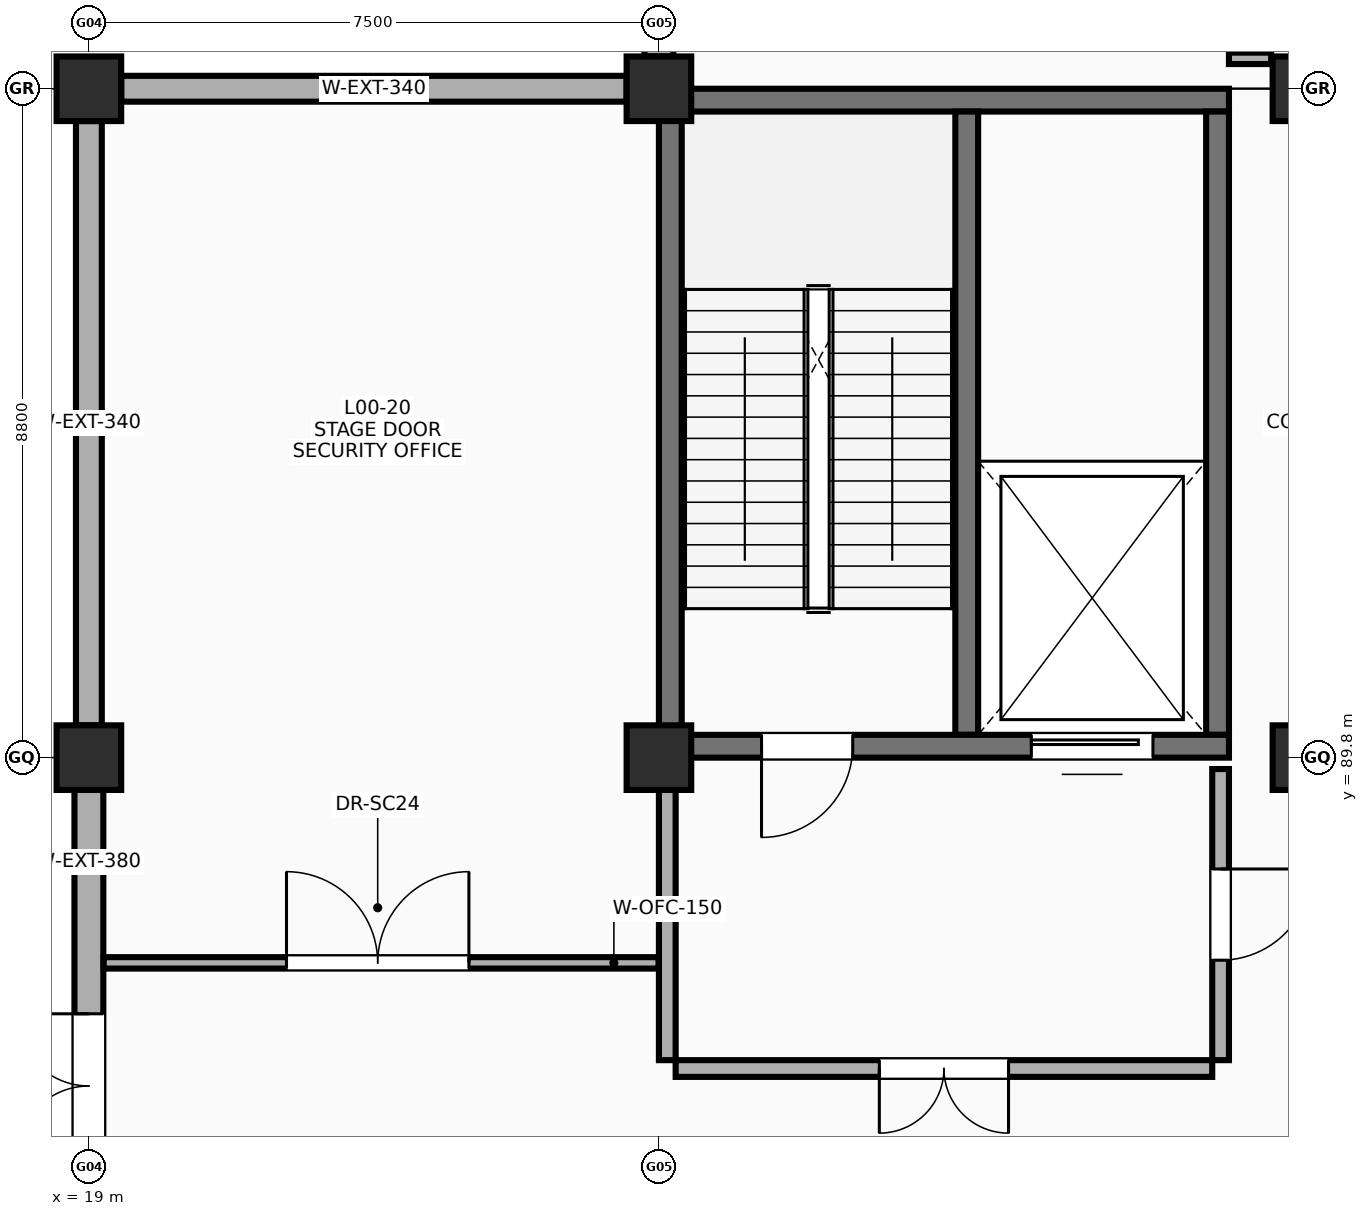
"""IFC4 building model, lengths in metres.
Left out: names, types, materials, properties, quantities, classifications, styles, units other than length and angle.
Written with IfcOpenShell. Run it as: python <this file> out.ifc"""

import sys

from ifc_helpers import new_model, si_unit, direction, frame, frame_2d, origin, origin_2d, place, context, subcontext, project, spatial, rectangle, extrude, element, fill, save


model = new_model("IFC4")
c1 = context("Model", 3, precision=1e-05, world=origin(), true_north=direction((0.0, 1.0)))
c2 = subcontext(c1, "Body", "Model", "MODEL_VIEW")
j1 = project(units=[si_unit("LENGTHUNIT", "METRE"), si_unit("PLANEANGLEUNIT", "RADIAN")], contexts=[c1])
p1 = place(None, origin())
s1 = spatial("IfcSite", under=j1, at=p1, CompositionType="ELEMENT")
p2 = place(p1, origin())
s2 = spatial("IfcBuilding", under=s1, at=p2, CompositionType="ELEMENT")
p3 = place(p2, origin())
s3 = spatial("IfcBuildingStorey", under=s2, at=p3, CompositionType="ELEMENT", Elevation=0.0)
for number, where, z_axis, x_axis in (
    (1, (19.0, 89.8, 0.0), (0.0, 0.0, 1.0), (1.0, 0.0, 0.0)),
    (2, (19.0, 98.6, 0.0), (0.0, 0.0, 1.0), (1.0, 0.0, 0.0)),
    (3, (26.5, 89.8, 0.0), (0.0, 0.0, 1.0), (1.0, 0.0, 0.0)),
    (4, (26.5, 98.6, 0.0), (0.0, 0.0, 1.0), (1.0, 0.0, 0.0)),
    (5, (35.0, 89.8, 0.0), (0.0, 0.0, 1.0), (1.0, 0.0, 0.0)),
    (6, (35.0, 98.6, 0.0), (0.0, 0.0, 1.0), (1.0, 0.0, 0.0)),
):
    element("IfcColumn", number, at=place(p3, frame(where, z_axis=z_axis, x_axis=x_axis)), inside=s3, PredefinedType="COLUMN", context=c2, shape_type="SweptSolid", body=[
        extrude(rectangle(XDim=0.85, YDim=0.85, at=origin_2d()), origin(), (0.0, 0.0, 1.0), 5.4),
    ])
p4 = place(p3, frame((26.5, 98.45, 0.0), z_axis=(0.0, 0.0, 1.0), x_axis=(1.0, 0.0, 0.0)))
e7 = element("IfcWall", 7, at=p4, inside=s3, PredefinedType="SHEAR", context=c2, shape_type="SweptSolid", body=[
    extrude(rectangle(XDim=7.5, YDim=0.3, at=frame_2d((3.75, 0.0))), origin(), (0.0, 0.0, 1.0), 5.4),
])
for number, where, z_axis, x_axis in (
    (8, (26.65, 90.1, 0.0), (0.0, 0.0, 1.0), (0.0, 1.0, 0.0)),
    (9, (33.85, 90.1, 0.0), (0.0, 0.0, 1.0), (0.0, 1.0, 0.0)),
    (10, (30.55, 90.1, 0.0), (0.0, 0.0, 1.0), (0.0, 1.0, 0.0)),
):
    element("IfcWall", number, at=place(p3, frame(where, z_axis=z_axis, x_axis=x_axis)), inside=s3, PredefinedType="SHEAR", context=c2, shape_type="SweptSolid", body=[
        extrude(rectangle(XDim=8.2, YDim=0.3, at=frame_2d((4.1, 0.0))), origin(), (0.0, 0.0, 1.0), 5.4),
    ])
p5 = place(p3, frame((26.5, 99.025, 0.0), z_axis=(0.0, 0.0, 1.0), x_axis=(0.0, 1.0, 0.0)))
e11 = element("IfcWall", 11, at=p5, inside=s3, PredefinedType="SOLIDWALL", context=c2, shape_type="SweptSolid", body=[
    extrude(rectangle(XDim=9.595, YDim=0.38, at=frame_2d((4.798, 0.0))), origin(), (0.0, 0.0, 1.0), 3.9),
])
p6 = place(p5, frame((2.755, 0.0, 0.0)))
e12 = element("IfcOpeningElement", 12, at=p6, cuts=e11, PredefinedType="OPENING", context=c2, shape_type="SweptSolid", body=[
    extrude(rectangle(XDim=4.2, YDim=3.6, at=frame_2d((2.1, 1.8))), frame((0.0, 0.2, 0.0), z_axis=(0.0, -1.0, 0.0), x_axis=(1.0, 0.0, 0.0)), (0.0, 0.0, 1.0), 0.4),
])
p7 = place(p3, frame((19.0, 81.625, 0.0), z_axis=(0.0, 0.0, 1.0), x_axis=(0.0, 1.0, 0.0)))
e13 = element("IfcWall", 13, at=p7, inside=s3, PredefinedType="SOLIDWALL", context=c2, shape_type="SweptSolid", body=[
    extrude(rectangle(XDim=7.75, YDim=0.38, at=frame_2d((3.875, 0.0))), origin(), (0.0, 0.0, 1.0), 4.15),
])
p8 = place(p7, frame((2.905, 0.0, 0.0)))
e14 = element("IfcOpeningElement", 14, at=p8, cuts=e13, PredefinedType="OPENING", context=c2, shape_type="SweptSolid", body=[
    extrude(rectangle(XDim=1.9, YDim=2.35, at=frame_2d((0.95, 1.175))), frame((0.0, 0.2, 0.0), z_axis=(0.0, -1.0, 0.0), x_axis=(1.0, 0.0, 0.0)), (0.0, 0.0, 1.0), 0.4),
])
p9 = place(p3, frame((19.0, 90.225, 0.0), z_axis=(0.0, 0.0, 1.0), x_axis=(0.0, 1.0, 0.0)))
e15 = element("IfcWall", 15, at=p9, inside=s3, PredefinedType="SOLIDWALL", context=c2, shape_type="SweptSolid", body=[
    extrude(rectangle(XDim=7.95, YDim=0.34, at=frame_2d((3.975, 0.0))), origin(), (0.0, 0.0, 1.0), 4.15),
])
p10 = place(p3, frame((19.425, 98.6, 0.0), z_axis=(0.0, 0.0, 1.0), x_axis=(1.0, 0.0, 0.0)))
e16 = element("IfcWall", 16, at=p10, inside=s3, PredefinedType="SOLIDWALL", context=c2, shape_type="SweptSolid", body=[
    extrude(rectangle(XDim=6.65, YDim=0.34, at=frame_2d((3.325, 0.0))), origin(), (0.0, 0.0, 1.0), 3.9),
])
p11 = place(p3, frame((26.5, 89.95, 0.0), z_axis=(0.0, 0.0, 1.0), x_axis=(1.0, 0.0, 0.0)))
e17 = element("IfcWall", 17, at=p11, inside=s3, PredefinedType="SHEAR", context=c2, shape_type="SweptSolid", body=[
    extrude(rectangle(XDim=7.5, YDim=0.3, at=frame_2d((3.75, 0.0))), origin(), (0.0, 0.0, 1.0), 5.4),
])
p12 = place(p11, frame((2.55, 0.0, 0.0), z_axis=(0.0, 0.0, 1.0), x_axis=(-1.0, 0.0, 0.0)))
e18 = element("IfcOpeningElement", 18, at=p12, cuts=e17, PredefinedType="OPENING", context=c2, shape_type="SweptSolid", body=[
    extrude(rectangle(XDim=1.2, YDim=2.15, at=frame_2d((0.6, 1.075))), frame((0.0, 0.16, 0.0), z_axis=(0.0, -1.0, 0.0), x_axis=(1.0, 0.0, 0.0)), (0.0, 0.0, 1.0), 0.32),
])
p13 = place(p11, frame((4.9, 0.0, 0.0)))
e19 = element("IfcOpeningElement", 19, at=p13, cuts=e17, PredefinedType="OPENING", context=c2, shape_type="SweptSolid", body=[
    extrude(rectangle(XDim=1.6, YDim=2.25, at=frame_2d((0.8, 1.125))), frame((0.0, 0.16, 0.0), z_axis=(0.0, -1.0, 0.0), x_axis=(1.0, 0.0, 0.0)), (0.0, 0.0, 1.0), 0.32),
])
p14 = place(p3, frame((26.72, 85.71, 0.0), z_axis=(0.0, 0.0, 1.0), x_axis=(1.0, 0.0, 0.0)))
e20 = element("IfcWall", 20, at=p14, inside=s3, PredefinedType="SOLIDWALL", context=c2, shape_type="SweptSolid", body=[
    extrude(rectangle(XDim=7.06, YDim=0.22, at=frame_2d((3.53, 0.0))), origin(), (0.0, 0.0, 1.0), 4.2),
])
p15 = place(p14, frame((4.38, 0.0, 0.0), z_axis=(0.0, 0.0, 1.0), x_axis=(-1.0, 0.0, 0.0)))
e21 = element("IfcOpeningElement", 21, at=p15, cuts=e20, PredefinedType="OPENING", context=c2, shape_type="SweptSolid", body=[
    extrude(rectangle(XDim=1.7, YDim=2.18, at=frame_2d((0.85, 1.09))), frame((0.0, 0.12, 0.0), z_axis=(0.0, -1.0, 0.0), x_axis=(1.0, 0.0, 0.0)), (0.0, 0.0, 1.0), 0.24),
])
p16 = place(p3, frame((26.61, 85.82, 0.0), z_axis=(0.0, 0.0, 1.0), x_axis=(0.0, 1.0, 0.0)))
e22 = element("IfcWall", 22, at=p16, inside=s3, PredefinedType="SOLIDWALL", context=c2, shape_type="SweptSolid", body=[
    extrude(rectangle(XDim=3.83, YDim=0.22, at=frame_2d((1.915, 0.0))), origin(), (0.0, 0.0, 1.0), 4.2),
])
p17 = place(p3, frame((33.89, 85.82, 0.0), z_axis=(0.0, 0.0, 1.0), x_axis=(0.0, 1.0, 0.0)))
e23 = element("IfcWall", 23, at=p17, inside=s3, PredefinedType="SOLIDWALL", context=c2, shape_type="SweptSolid", body=[
    extrude(rectangle(XDim=3.83, YDim=0.22, at=frame_2d((1.915, 0.0))), origin(), (0.0, 0.0, 1.0), 4.2),
])
p18 = place(p17, frame((2.515, 0.0, 0.0), z_axis=(0.0, 0.0, 1.0), x_axis=(-1.0, 0.0, 0.0)))
e24 = element("IfcOpeningElement", 24, at=p18, cuts=e23, PredefinedType="OPENING", context=c2, shape_type="SweptSolid", body=[
    extrude(rectangle(XDim=1.2, YDim=2.15, at=frame_2d((0.6, 1.075))), frame((0.0, 0.12, 0.0), z_axis=(0.0, -1.0, 0.0), x_axis=(1.0, 0.0, 0.0)), (0.0, 0.0, 1.0), 0.24),
])
p19 = place(p3, frame((19.195, 87.1, 0.0), z_axis=(0.0, 0.0, 1.0), x_axis=(1.0, 0.0, 0.0)))
e25 = element("IfcWall", 25, at=p19, inside=s3, PredefinedType="PARTITIONING", context=c2, shape_type="SweptSolid", body=[
    extrude(rectangle(XDim=7.3, YDim=0.15, at=frame_2d((3.65, 0.0))), origin(), (0.0, 0.0, 1.0), 4.2),
])
p20 = place(p19, frame((2.405, 0.0, 0.0)))
e26 = element("IfcOpeningElement", 26, at=p20, cuts=e25, PredefinedType="OPENING", context=c2, shape_type="SweptSolid", body=[
    extrude(rectangle(XDim=2.4, YDim=2.6, at=frame_2d((1.2, 1.3))), frame((0.0, 0.085, 0.0), z_axis=(0.0, -1.0, 0.0), x_axis=(1.0, 0.0, 0.0)), (0.0, 0.0, 1.0), 0.17),
])
p21 = place(p3, frame((34.0, 99.0, 0.0), z_axis=(0.0, 0.0, 1.0), x_axis=(1.0, 0.0, 0.0)))
e27 = element("IfcWall", 27, at=p21, inside=s3, PredefinedType="PARTITIONING", context=c2, shape_type="SweptSolid", body=[
    extrude(rectangle(XDim=0.555, YDim=0.15, at=frame_2d((0.277, 0.0))), origin(), (0.0, 0.0, 1.0), 3.9),
])
p22 = place(p8, origin())
e28 = element("IfcDoor", 28, at=p22, inside=s3, OperationType="DOUBLE_DOOR_SINGLE_SWING", PredefinedType="DOOR", context=c2, shape_type="SweptSolid", body=[
    extrude(rectangle(XDim=1.9, YDim=2.35, at=frame_2d((0.95, 1.175))), frame((0.0, 0.025, 0.0), z_axis=(0.0, -1.0, 0.0), x_axis=(1.0, 0.0, 0.0)), (0.0, 0.0, 1.0), 0.05),
])
fill(e14, e28)
p23 = place(p12, origin())
e29 = element("IfcDoor", 29, at=p23, inside=s3, OperationType="SINGLE_SWING_RIGHT", PredefinedType="DOOR", context=c2, shape_type="SweptSolid", body=[
    extrude(rectangle(XDim=1.2, YDim=2.15, at=frame_2d((0.6, 1.075))), frame((0.0, 0.025, 0.0), z_axis=(0.0, -1.0, 0.0), x_axis=(1.0, 0.0, 0.0)), (0.0, 0.0, 1.0), 0.05),
])
fill(e18, e29)
p24 = place(p13, origin())
e30 = element("IfcDoor", 30, at=p24, inside=s3, OperationType="SLIDING_TO_LEFT", PredefinedType="DOOR", context=c2, shape_type="SweptSolid", body=[
    extrude(rectangle(XDim=1.6, YDim=2.25, at=frame_2d((0.8, 1.125))), frame((0.0, 0.025, 0.0), z_axis=(0.0, -1.0, 0.0), x_axis=(1.0, 0.0, 0.0)), (0.0, 0.0, 1.0), 0.05),
])
fill(e19, e30)
p25 = place(p15, origin())
e31 = element("IfcDoor", 31, at=p25, inside=s3, OperationType="DOUBLE_DOOR_SINGLE_SWING", PredefinedType="DOOR", context=c2, shape_type="SweptSolid", body=[
    extrude(rectangle(XDim=1.7, YDim=2.18, at=frame_2d((0.85, 1.09))), frame((0.0, 0.025, 0.0), z_axis=(0.0, -1.0, 0.0), x_axis=(1.0, 0.0, 0.0)), (0.0, 0.0, 1.0), 0.05),
])
fill(e21, e31)
p26 = place(p18, origin())
e32 = element("IfcDoor", 32, at=p26, inside=s3, OperationType="SINGLE_SWING_LEFT", PredefinedType="DOOR", context=c2, shape_type="SweptSolid", body=[
    extrude(rectangle(XDim=1.2, YDim=2.15, at=frame_2d((0.6, 1.075))), frame((0.0, 0.025, 0.0), z_axis=(0.0, -1.0, 0.0), x_axis=(1.0, 0.0, 0.0)), (0.0, 0.0, 1.0), 0.05),
])
fill(e24, e32)
p27 = place(p20, origin())
e33 = element("IfcDoor", 33, at=p27, inside=s3, OperationType="DOUBLE_DOOR_SINGLE_SWING", PredefinedType="DOOR", context=c2, shape_type="SweptSolid", body=[
    extrude(rectangle(XDim=2.4, YDim=2.6, at=frame_2d((1.2, 1.3))), frame((0.0, 0.025, 0.0), z_axis=(0.0, -1.0, 0.0), x_axis=(1.0, 0.0, 0.0)), (0.0, 0.0, 1.0), 0.05),
])
fill(e26, e33)
save(model, sys.argv[1])
